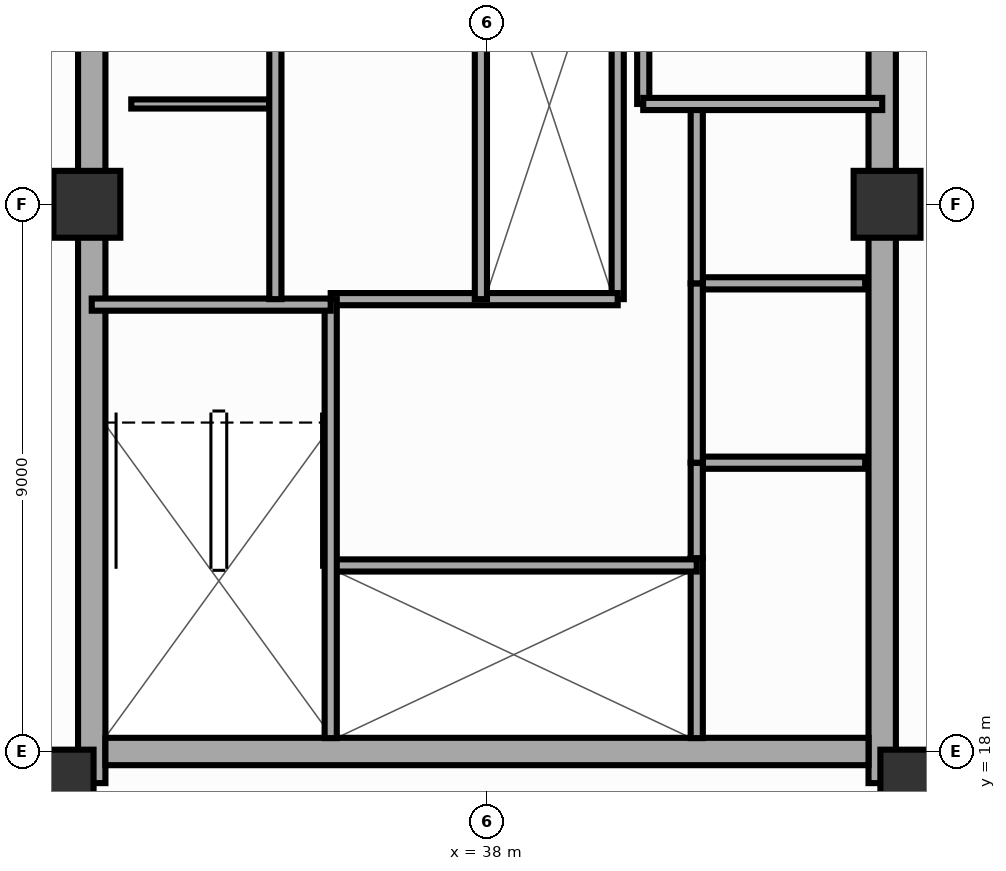
"""IFC4 building model, lengths in metres.
Left out: names, types, materials, properties, quantities, classifications, styles, units other than length and angle.
Written with IfcOpenShell. Run it as: python <this file> out.ifc"""

import sys

from ifc_helpers import new_model, si_unit, direction, frame, frame_2d, origin, origin_2d, place, context, subcontext, project, spatial, rectangle, extrude, source, transform, mapped, element, fill, save


model = new_model("IFC4")
c1 = context("Model", 3, precision=1e-05, world=origin(), true_north=direction((0.0, 1.0)))
c2 = subcontext(c1, "Body", "Model", "MODEL_VIEW")
j1 = project(units=[si_unit("LENGTHUNIT", "METRE"), si_unit("PLANEANGLEUNIT", "RADIAN")], contexts=[c1])
p1 = place(None, origin())
s1 = spatial("IfcSite", under=j1, at=p1, CompositionType="ELEMENT")
p2 = place(p1, origin())
s2 = spatial("IfcBuilding", under=s1, at=p2, CompositionType="ELEMENT")
p3 = place(p2, frame((0.0, 0.0, 148.7)))
s3 = spatial("IfcBuildingStorey", under=s2, at=p3, CompositionType="ELEMENT", Elevation=148.7)
p4 = place(p3, frame((31.5, 17.48, 0.0), z_axis=(0.0, 0.0, 1.0), x_axis=(0.0, 1.0, 0.0)))
e1 = element("IfcWall", 1, at=p4, inside=s3, PredefinedType="SHEAR", context=c2, shape_type="SweptSolid", body=[
    extrude(rectangle(XDim=19.04, YDim=0.45, at=frame_2d((9.52, 0.0))), origin(), (0.0, 0.0, 1.0), 3.5),
])
p5 = place(p4, frame((6.32, 0.0, 0.0)))
e2 = element("IfcOpeningElement", 2, at=p5, cuts=e1, PredefinedType="OPENING", context=c2, shape_type="SweptSolid", body=[
    extrude(rectangle(XDim=1.1, YDim=2.15, at=frame_2d((0.55, 1.075))), frame((0.0, 0.237, 0.0), z_axis=(0.0, -1.0, 0.0), x_axis=(1.0, 0.0, 0.0)), (0.0, 0.0, 1.0), 0.474),
])
p6 = place(p3, frame((44.5, 17.48, 0.0), z_axis=(0.0, 0.0, 1.0), x_axis=(0.0, 1.0, 0.0)))
e3 = element("IfcWall", 3, at=p6, inside=s3, PredefinedType="SHEAR", context=c2, shape_type="SweptSolid", body=[
    extrude(rectangle(XDim=19.04, YDim=0.45, at=frame_2d((9.52, 0.0))), origin(), (0.0, 0.0, 1.0), 3.5),
])
p7 = place(p6, frame((12.67, 0.0, 0.0), z_axis=(0.0, 0.0, 1.0), x_axis=(-1.0, 0.0, 0.0)))
e4 = element("IfcOpeningElement", 4, at=p7, cuts=e3, PredefinedType="OPENING", context=c2, shape_type="SweptSolid", body=[
    extrude(rectangle(XDim=1.1, YDim=2.15, at=frame_2d((0.55, 1.075))), frame((0.0, 0.237, 0.0), z_axis=(0.0, -1.0, 0.0), x_axis=(1.0, 0.0, 0.0)), (0.0, 0.0, 1.0), 0.474),
])
p8 = place(p3, frame((31.725, 18.0, 0.0), z_axis=(0.0, 0.0, 1.0), x_axis=(1.0, 0.0, 0.0)))
e5 = element("IfcWall", 5, at=p8, inside=s3, PredefinedType="SHEAR", context=c2, shape_type="SweptSolid", body=[
    extrude(rectangle(XDim=12.55, YDim=0.45, at=frame_2d((6.275, 0.0))), origin(), (0.0, 0.0, 1.0), 3.5),
])
m1 = source(origin(), c2, "Body", "SweptSolid", [
    extrude(rectangle(XDim=1.1, YDim=1.1, at=origin_2d()), origin(), (0.0, 0.0, 1.0), 3.5),
])
for number, where, z_axis, x_axis in (
    (6, (30.98, 17.48, 0.0), (0.0, 0.0, 1.0), (1.0, 0.0, 0.0)),
    (7, (45.02, 17.48, 0.0), (0.0, 0.0, 1.0), (1.0, 0.0, 0.0)),
    (8, (31.42, 27.0, 0.0), (0.0, 0.0, 1.0), (1.0, 0.0, 0.0)),
    (9, (44.58, 27.0, 0.0), (0.0, 0.0, 1.0), (1.0, 0.0, 0.0)),
):
    element("IfcColumn", number, at=place(p3, frame(where, z_axis=z_axis, x_axis=x_axis)), inside=s3, PredefinedType="COLUMN", context=c2, shape_type="MappedRepresentation", body=[
        mapped(m1, transform((0.0, 0.0, 0.0), scale=1.0)),
    ])
p9 = place(p3, frame((32.15, 28.65, 0.0), z_axis=(0.0, 0.0, 1.0), x_axis=(1.0, 0.0, 0.0)))
e10 = element("IfcWall", 10, at=p9, inside=s3, PredefinedType="PARTITIONING", context=c2, shape_type="SweptSolid", body=[
    extrude(rectangle(XDim=2.27, YDim=0.15, at=frame_2d((1.135, 0.0))), origin(), (0.0, 0.0, 1.0), 2.64),
])
p10 = place(p3, frame((41.55, 22.75, 0.0), z_axis=(0.0, 0.0, 1.0), x_axis=(1.0, 0.0, 0.0)))
e11 = element("IfcWall", 11, at=p10, inside=s3, PredefinedType="PARTITIONING", context=c2, shape_type="SweptSolid", body=[
    extrude(rectangle(XDim=2.67, YDim=0.2, at=frame_2d((1.335, 0.0))), origin(), (0.0, 0.0, 1.0), 3.16),
])
p11 = place(p3, frame((41.55, 25.7, 0.0), z_axis=(0.0, 0.0, 1.0), x_axis=(1.0, 0.0, 0.0)))
e12 = element("IfcWall", 12, at=p11, inside=s3, PredefinedType="PARTITIONING", context=c2, shape_type="SweptSolid", body=[
    extrude(rectangle(XDim=2.67, YDim=0.2, at=frame_2d((1.335, 0.0))), origin(), (0.0, 0.0, 1.0), 2.64),
])
p12 = place(p3, frame((41.45, 18.22, 0.0), z_axis=(0.0, 0.0, 1.0), x_axis=(0.0, 1.0, 0.0)))
e13 = element("IfcWall", 13, at=p12, inside=s3, PredefinedType="PARTITIONING", context=c2, shape_type="SweptSolid", body=[
    extrude(rectangle(XDim=2.96, YDim=0.2, at=frame_2d((1.48, 0.0))), origin(), (0.0, 0.0, 1.0), 3.16),
])
p13 = place(p3, frame((41.45, 21.18, 0.0), z_axis=(0.0, 0.0, 1.0), x_axis=(0.0, 1.0, 0.0)))
e14 = element("IfcWall", 14, at=p13, inside=s3, PredefinedType="PARTITIONING", context=c2, shape_type="SweptSolid", body=[
    extrude(rectangle(XDim=1.57, YDim=0.2, at=frame_2d((0.785, 0.0))), origin(), (0.0, 0.0, 1.0), 3.16),
])
p14 = place(p13, frame((0.38, 0.0, 0.0)))
e15 = element("IfcOpeningElement", 15, at=p14, cuts=e14, PredefinedType="OPENING", context=c2, shape_type="SweptSolid", body=[
    extrude(rectangle(XDim=0.8, YDim=2.05, at=frame_2d((0.4, 1.025))), frame((0.0, 0.112, 0.0), z_axis=(0.0, -1.0, 0.0), x_axis=(1.0, 0.0, 0.0)), (0.0, 0.0, 1.0), 0.224),
])
p15 = place(p3, frame((41.45, 22.75, 0.0), z_axis=(0.0, 0.0, 1.0), x_axis=(0.0, 1.0, 0.0)))
e16 = element("IfcWall", 16, at=p15, inside=s3, PredefinedType="PARTITIONING", context=c2, shape_type="SweptSolid", body=[
    extrude(rectangle(XDim=2.95, YDim=0.2, at=frame_2d((1.475, 0.0))), origin(), (0.0, 0.0, 1.0), 3.16),
])
p16 = place(p15, frame((1.05, 0.0, 0.0)))
e17 = element("IfcOpeningElement", 17, at=p16, cuts=e16, PredefinedType="OPENING", context=c2, shape_type="SweptSolid", body=[
    extrude(rectangle(XDim=0.8, YDim=2.05, at=frame_2d((0.4, 1.025))), frame((0.0, 0.112, 0.0), z_axis=(0.0, -1.0, 0.0), x_axis=(1.0, 0.0, 0.0)), (0.0, 0.0, 1.0), 0.224),
])
p17 = place(p3, frame((41.45, 25.7, 0.0), z_axis=(0.0, 0.0, 1.0), x_axis=(0.0, 1.0, 0.0)))
e18 = element("IfcWall", 18, at=p17, inside=s3, PredefinedType="PARTITIONING", context=c2, shape_type="SweptSolid", body=[
    extrude(rectangle(XDim=2.9, YDim=0.2, at=frame_2d((1.45, 0.0))), origin(), (0.0, 0.0, 1.0), 3.16),
])
p18 = place(p17, frame((1.0, 0.0, 0.0)))
e19 = element("IfcOpeningElement", 19, at=p18, cuts=e18, PredefinedType="OPENING", context=c2, shape_type="SweptSolid", body=[
    extrude(rectangle(XDim=0.9, YDim=2.1, at=frame_2d((0.45, 1.05))), frame((0.0, 0.112, 0.0), z_axis=(0.0, -1.0, 0.0), x_axis=(1.0, 0.0, 0.0)), (0.0, 0.0, 1.0), 0.224),
])
p19 = place(p3, frame((40.15, 25.44, 0.0), z_axis=(0.0, 0.0, 1.0), x_axis=(0.0, 1.0, 0.0)))
e20 = element("IfcWall", 20, at=p19, inside=s3, PredefinedType="PARTITIONING", context=c2, shape_type="SweptSolid", body=[
    extrude(rectangle(XDim=6.36, YDim=0.2, at=frame_2d((3.18, 0.0))), origin(), (0.0, 0.0, 1.0), 3.16),
])
p20 = place(p3, frame((35.43, 21.06, 0.0), z_axis=(0.0, 0.0, 1.0), x_axis=(1.0, 0.0, 0.0)))
e21 = element("IfcWall", 21, at=p20, inside=s3, PredefinedType="PARTITIONING", context=c2, shape_type="SweptSolid", body=[
    extrude(rectangle(XDim=6.02, YDim=0.2, at=frame_2d((3.01, 0.0))), origin(), (0.0, 0.0, 1.0), 3.16),
])
p21 = place(p20, frame((1.0, 0.0, 0.0)))
e22 = element("IfcOpeningElement", 22, at=p21, cuts=e21, PredefinedType="OPENING", context=c2, shape_type="SweptSolid", body=[
    extrude(rectangle(XDim=1.1, YDim=2.15, at=frame_2d((0.55, 1.075))), frame((0.0, 0.112, 0.0), z_axis=(0.0, -1.0, 0.0), x_axis=(1.0, 0.0, 0.0)), (0.0, 0.0, 1.0), 0.224),
])
p22 = place(p20, frame((2.95, 0.0, 0.0)))
e23 = element("IfcOpeningElement", 23, at=p22, cuts=e21, PredefinedType="OPENING", context=c2, shape_type="SweptSolid", body=[
    extrude(rectangle(XDim=1.1, YDim=2.15, at=frame_2d((0.55, 1.075))), frame((0.0, 0.112, 0.0), z_axis=(0.0, -1.0, 0.0), x_axis=(1.0, 0.0, 0.0)), (0.0, 0.0, 1.0), 0.224),
])
p23 = place(p20, frame((4.58, 0.0, 0.0)))
e24 = element("IfcOpeningElement", 24, at=p23, cuts=e21, PredefinedType="OPENING", context=c2, shape_type="SweptSolid", body=[
    extrude(rectangle(XDim=1.2, YDim=2.15, at=frame_2d((0.6, 1.075))), frame((0.0, 0.112, 0.0), z_axis=(0.0, -1.0, 0.0), x_axis=(1.0, 0.0, 0.0)), (0.0, 0.0, 1.0), 0.224),
])
p24 = place(p3, frame((35.43, 25.44, 0.0), z_axis=(0.0, 0.0, 1.0), x_axis=(1.0, 0.0, 0.0)))
e25 = element("IfcWall", 25, at=p24, inside=s3, PredefinedType="PARTITIONING", context=c2, shape_type="SweptSolid", body=[
    extrude(rectangle(XDim=4.72, YDim=0.2, at=frame_2d((2.36, 0.0))), origin(), (0.0, 0.0, 1.0), 3.16),
])
p25 = place(p24, frame((1.25, 0.0, 0.0)))
e26 = element("IfcOpeningElement", 26, at=p25, cuts=e25, PredefinedType="OPENING", context=c2, shape_type="SweptSolid", body=[
    extrude(rectangle(XDim=1.1, YDim=2.15, at=frame_2d((0.55, 1.075))), frame((0.0, 0.112, 0.0), z_axis=(0.0, -1.0, 0.0), x_axis=(1.0, 0.0, 0.0)), (0.0, 0.0, 1.0), 0.224),
])
p26 = place(p3, frame((35.43, 18.22, 0.0), z_axis=(0.0, 0.0, 1.0), x_axis=(0.0, 1.0, 0.0)))
e27 = element("IfcWall", 27, at=p26, inside=s3, PredefinedType="SOLIDWALL", context=c2, shape_type="SweptSolid", body=[
    extrude(rectangle(XDim=7.22, YDim=0.2, at=frame_2d((3.61, 0.0))), origin(), (0.0, 0.0, 1.0), 3.29),
])
p27 = place(p26, frame((6.68, 0.0, 0.0), z_axis=(0.0, 0.0, 1.0), x_axis=(-1.0, 0.0, 0.0)))
e28 = element("IfcOpeningElement", 28, at=p27, cuts=e27, PredefinedType="OPENING", context=c2, shape_type="SweptSolid", body=[
    extrude(rectangle(XDim=1.1, YDim=2.15, at=frame_2d((0.55, 1.075))), frame((0.0, 0.112, 0.0), z_axis=(0.0, -1.0, 0.0), x_axis=(1.0, 0.0, 0.0)), (0.0, 0.0, 1.0), 0.224),
])
p28 = place(p3, frame((31.5, 25.35, 0.0), z_axis=(0.0, 0.0, 1.0), x_axis=(1.0, 0.0, 0.0)))
e29 = element("IfcWall", 29, at=p28, inside=s3, PredefinedType="SOLIDWALL", context=c2, shape_type="SweptSolid", body=[
    extrude(rectangle(XDim=3.93, YDim=0.2, at=frame_2d((1.965, 0.0))), origin(), (0.0, 0.0, 1.0), 3.29),
])
p29 = place(p3, frame((40.57, 28.65, 0.0), z_axis=(0.0, 0.0, 1.0), x_axis=(0.0, 1.0, 0.0)))
e30 = element("IfcWall", 30, at=p29, inside=s3, PredefinedType="SOLIDWALL", context=c2, shape_type="SweptSolid", body=[
    extrude(rectangle(XDim=7.05, YDim=0.2, at=frame_2d((3.525, 0.0))), origin(), (0.0, 0.0, 1.0), 3.29),
])
p30 = place(p3, frame((40.57, 28.65, 0.0), z_axis=(0.0, 0.0, 1.0), x_axis=(1.0, 0.0, 0.0)))
e31 = element("IfcWall", 31, at=p30, inside=s3, PredefinedType="SOLIDWALL", context=c2, shape_type="SweptSolid", body=[
    extrude(rectangle(XDim=3.93, YDim=0.2, at=frame_2d((1.965, 0.0))), origin(), (0.0, 0.0, 1.0), 3.29),
])
p31 = place(p3, frame((34.52, 25.44, 0.0), z_axis=(0.0, 0.0, 1.0), x_axis=(0.0, 1.0, 0.0)))
e32 = element("IfcWall", 32, at=p31, inside=s3, PredefinedType="PARTITIONING", context=c2, shape_type="SweptSolid", body=[
    extrude(rectangle(XDim=10.34, YDim=0.2, at=frame_2d((5.17, 0.0))), origin(), (0.0, 0.0, 1.0), 3.16),
])
p32 = place(p31, frame((1.15, 0.0, 0.0)))
e33 = element("IfcOpeningElement", 33, at=p32, cuts=e32, PredefinedType="OPENING", context=c2, shape_type="SweptSolid", body=[
    extrude(rectangle(XDim=0.9, YDim=2.1, at=frame_2d((0.45, 1.05))), frame((0.0, 0.112, 0.0), z_axis=(0.0, -1.0, 0.0), x_axis=(1.0, 0.0, 0.0)), (0.0, 0.0, 1.0), 0.224),
])
p33 = place(p31, frame((4.35, 0.0, 0.0)))
e34 = element("IfcOpeningElement", 34, at=p33, cuts=e32, PredefinedType="OPENING", context=c2, shape_type="SweptSolid", body=[
    extrude(rectangle(XDim=0.9, YDim=2.1, at=frame_2d((0.45, 1.05))), frame((0.0, 0.112, 0.0), z_axis=(0.0, -1.0, 0.0), x_axis=(1.0, 0.0, 0.0)), (0.0, 0.0, 1.0), 0.224),
])
p34 = place(p31, frame((7.01, 0.0, 0.0)))
e35 = element("IfcOpeningElement", 35, at=p34, cuts=e32, PredefinedType="OPENING", context=c2, shape_type="SweptSolid", body=[
    extrude(rectangle(XDim=1.0, YDim=2.15, at=frame_2d((0.5, 1.075))), frame((0.0, 0.112, 0.0), z_axis=(0.0, -1.0, 0.0), x_axis=(1.0, 0.0, 0.0)), (0.0, 0.0, 1.0), 0.224),
])
p35 = place(p31, frame((8.76, 0.0, 0.0)))
e36 = element("IfcOpeningElement", 36, at=p35, cuts=e32, PredefinedType="OPENING", context=c2, shape_type="SweptSolid", body=[
    extrude(rectangle(XDim=1.0, YDim=2.15, at=frame_2d((0.5, 1.075))), frame((0.0, 0.112, 0.0), z_axis=(0.0, -1.0, 0.0), x_axis=(1.0, 0.0, 0.0)), (0.0, 0.0, 1.0), 0.224),
])
p36 = place(p3, frame((37.9, 25.44, 0.0), z_axis=(0.0, 0.0, 1.0), x_axis=(0.0, 1.0, 0.0)))
e37 = element("IfcWall", 37, at=p36, inside=s3, PredefinedType="PARTITIONING", context=c2, shape_type="SweptSolid", body=[
    extrude(rectangle(XDim=10.34, YDim=0.2, at=frame_2d((5.17, 0.0))), origin(), (0.0, 0.0, 1.0), 3.16),
])
p37 = place(p36, frame((0.32, 0.0, 0.0)))
e38 = element("IfcOpeningElement", 38, at=p37, cuts=e37, PredefinedType="OPENING", context=c2, shape_type="SweptSolid", body=[
    extrude(rectangle(XDim=1.0, YDim=2.15, at=frame_2d((0.5, 1.075))), frame((0.0, 0.112, 0.0), z_axis=(0.0, -1.0, 0.0), x_axis=(1.0, 0.0, 0.0)), (0.0, 0.0, 1.0), 0.224),
])
p38 = place(p36, frame((1.71, 0.0, 0.0)))
e39 = element("IfcOpeningElement", 39, at=p38, cuts=e37, PredefinedType="OPENING", context=c2, shape_type="SweptSolid", body=[
    extrude(rectangle(XDim=1.0, YDim=2.15, at=frame_2d((0.5, 1.075))), frame((0.0, 0.112, 0.0), z_axis=(0.0, -1.0, 0.0), x_axis=(1.0, 0.0, 0.0)), (0.0, 0.0, 1.0), 0.224),
])
p39 = place(p36, frame((3.51, 0.0, 0.0)))
e40 = element("IfcOpeningElement", 40, at=p39, cuts=e37, PredefinedType="OPENING", context=c2, shape_type="SweptSolid", body=[
    extrude(rectangle(XDim=1.0, YDim=2.15, at=frame_2d((0.5, 1.075))), frame((0.0, 0.112, 0.0), z_axis=(0.0, -1.0, 0.0), x_axis=(1.0, 0.0, 0.0)), (0.0, 0.0, 1.0), 0.224),
])
p40 = place(p36, frame((5.01, 0.0, 0.0)))
e41 = element("IfcOpeningElement", 41, at=p40, cuts=e37, PredefinedType="OPENING", context=c2, shape_type="SweptSolid", body=[
    extrude(rectangle(XDim=1.0, YDim=2.15, at=frame_2d((0.5, 1.075))), frame((0.0, 0.112, 0.0), z_axis=(0.0, -1.0, 0.0), x_axis=(1.0, 0.0, 0.0)), (0.0, 0.0, 1.0), 0.224),
])
p41 = place(p36, frame((6.86, 0.0, 0.0)))
e42 = element("IfcOpeningElement", 42, at=p41, cuts=e37, PredefinedType="OPENING", context=c2, shape_type="SweptSolid", body=[
    extrude(rectangle(XDim=1.0, YDim=2.15, at=frame_2d((0.5, 1.075))), frame((0.0, 0.112, 0.0), z_axis=(0.0, -1.0, 0.0), x_axis=(1.0, 0.0, 0.0)), (0.0, 0.0, 1.0), 0.224),
])
p42 = place(p36, frame((8.71, 0.0, 0.0)))
e43 = element("IfcOpeningElement", 43, at=p42, cuts=e37, PredefinedType="OPENING", context=c2, shape_type="SweptSolid", body=[
    extrude(rectangle(XDim=1.0, YDim=2.15, at=frame_2d((0.5, 1.075))), frame((0.0, 0.112, 0.0), z_axis=(0.0, -1.0, 0.0), x_axis=(1.0, 0.0, 0.0)), (0.0, 0.0, 1.0), 0.224),
])
m2 = source(origin(), c2, "Body", "SweptSolid", [
    extrude(rectangle(XDim=1.1, YDim=2.15, at=frame_2d((0.55, 1.075))), frame((0.0, 0.025, 0.0), z_axis=(0.0, -1.0, 0.0), x_axis=(1.0, 0.0, 0.0)), (0.0, 0.0, 1.0), 0.05),
])
p43 = place(p5, origin())
e44 = element("IfcDoor", 44, at=p43, inside=s3, OperationType="SINGLE_SWING_LEFT", PredefinedType="DOOR", context=c2, shape_type="MappedRepresentation", body=[
    mapped(m2, transform((0.0, 0.0, 0.0), scale=1.0)),
])
fill(e2, e44)
p44 = place(p7, origin())
e45 = element("IfcDoor", 45, at=p44, inside=s3, OperationType="SINGLE_SWING_RIGHT", PredefinedType="DOOR", context=c2, shape_type="MappedRepresentation", body=[
    mapped(m2, transform((0.0, 0.0, 0.0), scale=1.0)),
])
fill(e4, e45)
m3 = source(origin(), c2, "Body", "SweptSolid", [
    extrude(rectangle(XDim=0.8, YDim=2.05, at=frame_2d((0.4, 1.025))), frame((0.0, 0.025, 0.0), z_axis=(0.0, -1.0, 0.0), x_axis=(1.0, 0.0, 0.0)), (0.0, 0.0, 1.0), 0.05),
])
p45 = place(p14, origin())
e46 = element("IfcDoor", 46, at=p45, inside=s3, OperationType="SINGLE_SWING_LEFT", PredefinedType="DOOR", context=c2, shape_type="MappedRepresentation", body=[
    mapped(m3, transform((0.0, 0.0, 0.0), scale=1.0)),
])
fill(e15, e46)
p46 = place(p16, origin())
e47 = element("IfcDoor", 47, at=p46, inside=s3, OperationType="SINGLE_SWING_RIGHT", PredefinedType="DOOR", context=c2, shape_type="MappedRepresentation", body=[
    mapped(m3, transform((0.0, 0.0, 0.0), scale=1.0)),
])
fill(e17, e47)
m4 = source(origin(), c2, "Body", "SweptSolid", [
    extrude(rectangle(XDim=0.9, YDim=2.1, at=frame_2d((0.45, 1.05))), frame((0.0, 0.025, 0.0), z_axis=(0.0, -1.0, 0.0), x_axis=(1.0, 0.0, 0.0)), (0.0, 0.0, 1.0), 0.05),
])
p47 = place(p18, origin())
e48 = element("IfcDoor", 48, at=p47, inside=s3, OperationType="SINGLE_SWING_LEFT", PredefinedType="DOOR", context=c2, shape_type="MappedRepresentation", body=[
    mapped(m4, transform((0.0, 0.0, 0.0), scale=1.0)),
])
fill(e19, e48)
p48 = place(p21, origin())
e49 = element("IfcDoor", 49, at=p48, inside=s3, OperationType="DOUBLE_DOOR_SLIDING", PredefinedType="DOOR", context=c2, shape_type="MappedRepresentation", body=[
    mapped(m2, transform((0.0, 0.0, 0.0), scale=1.0)),
])
fill(e22, e49)
p49 = place(p22, origin())
e50 = element("IfcDoor", 50, at=p49, inside=s3, OperationType="DOUBLE_DOOR_SLIDING", PredefinedType="DOOR", context=c2, shape_type="MappedRepresentation", body=[
    mapped(m2, transform((0.0, 0.0, 0.0), scale=1.0)),
])
fill(e23, e50)
m5 = source(origin(), c2, "Body", "SweptSolid", [
    extrude(rectangle(XDim=1.2, YDim=2.15, at=frame_2d((0.6, 1.075))), frame((0.0, 0.025, 0.0), z_axis=(0.0, -1.0, 0.0), x_axis=(1.0, 0.0, 0.0)), (0.0, 0.0, 1.0), 0.05),
])
p50 = place(p23, origin())
e51 = element("IfcDoor", 51, at=p50, inside=s3, OperationType="DOUBLE_DOOR_SLIDING", PredefinedType="DOOR", context=c2, shape_type="MappedRepresentation", body=[
    mapped(m5, transform((0.0, 0.0, 0.0), scale=1.0)),
])
fill(e24, e51)
p51 = place(p25, origin())
e52 = element("IfcDoor", 52, at=p51, inside=s3, OperationType="SINGLE_SWING_RIGHT", PredefinedType="DOOR", context=c2, shape_type="MappedRepresentation", body=[
    mapped(m2, transform((0.0, 0.0, 0.0), scale=1.0)),
])
fill(e26, e52)
p52 = place(p27, origin())
e53 = element("IfcDoor", 53, at=p52, inside=s3, OperationType="SINGLE_SWING_LEFT", PredefinedType="DOOR", context=c2, shape_type="MappedRepresentation", body=[
    mapped(m2, transform((0.0, 0.0, 0.0), scale=1.0)),
])
fill(e28, e53)
p53 = place(p32, origin())
e54 = element("IfcDoor", 54, at=p53, inside=s3, OperationType="SINGLE_SWING_RIGHT", PredefinedType="DOOR", context=c2, shape_type="MappedRepresentation", body=[
    mapped(m4, transform((0.0, 0.0, 0.0), scale=1.0)),
])
fill(e33, e54)
m6 = source(origin(), c2, "Body", "SweptSolid", [
    extrude(rectangle(XDim=1.0, YDim=2.15, at=frame_2d((0.5, 1.075))), frame((0.0, 0.025, 0.0), z_axis=(0.0, -1.0, 0.0), x_axis=(1.0, 0.0, 0.0)), (0.0, 0.0, 1.0), 0.05),
])
p54 = place(p37, origin())
e55 = element("IfcDoor", 55, at=p54, inside=s3, OperationType="DOUBLE_DOOR_SLIDING", PredefinedType="DOOR", context=c2, shape_type="MappedRepresentation", body=[
    mapped(m6, transform((0.0, 0.0, 0.0), scale=1.0)),
])
fill(e38, e55)
p55 = place(p38, origin())
e56 = element("IfcDoor", 56, at=p55, inside=s3, OperationType="DOUBLE_DOOR_SLIDING", PredefinedType="DOOR", context=c2, shape_type="MappedRepresentation", body=[
    mapped(m6, transform((0.0, 0.0, 0.0), scale=1.0)),
])
fill(e39, e56)
p56 = place(p39, origin())
e57 = element("IfcDoor", 57, at=p56, inside=s3, OperationType="DOUBLE_DOOR_SLIDING", PredefinedType="DOOR", context=c2, shape_type="MappedRepresentation", body=[
    mapped(m6, transform((0.0, 0.0, 0.0), scale=1.0)),
])
fill(e40, e57)
save(model, sys.argv[1])
